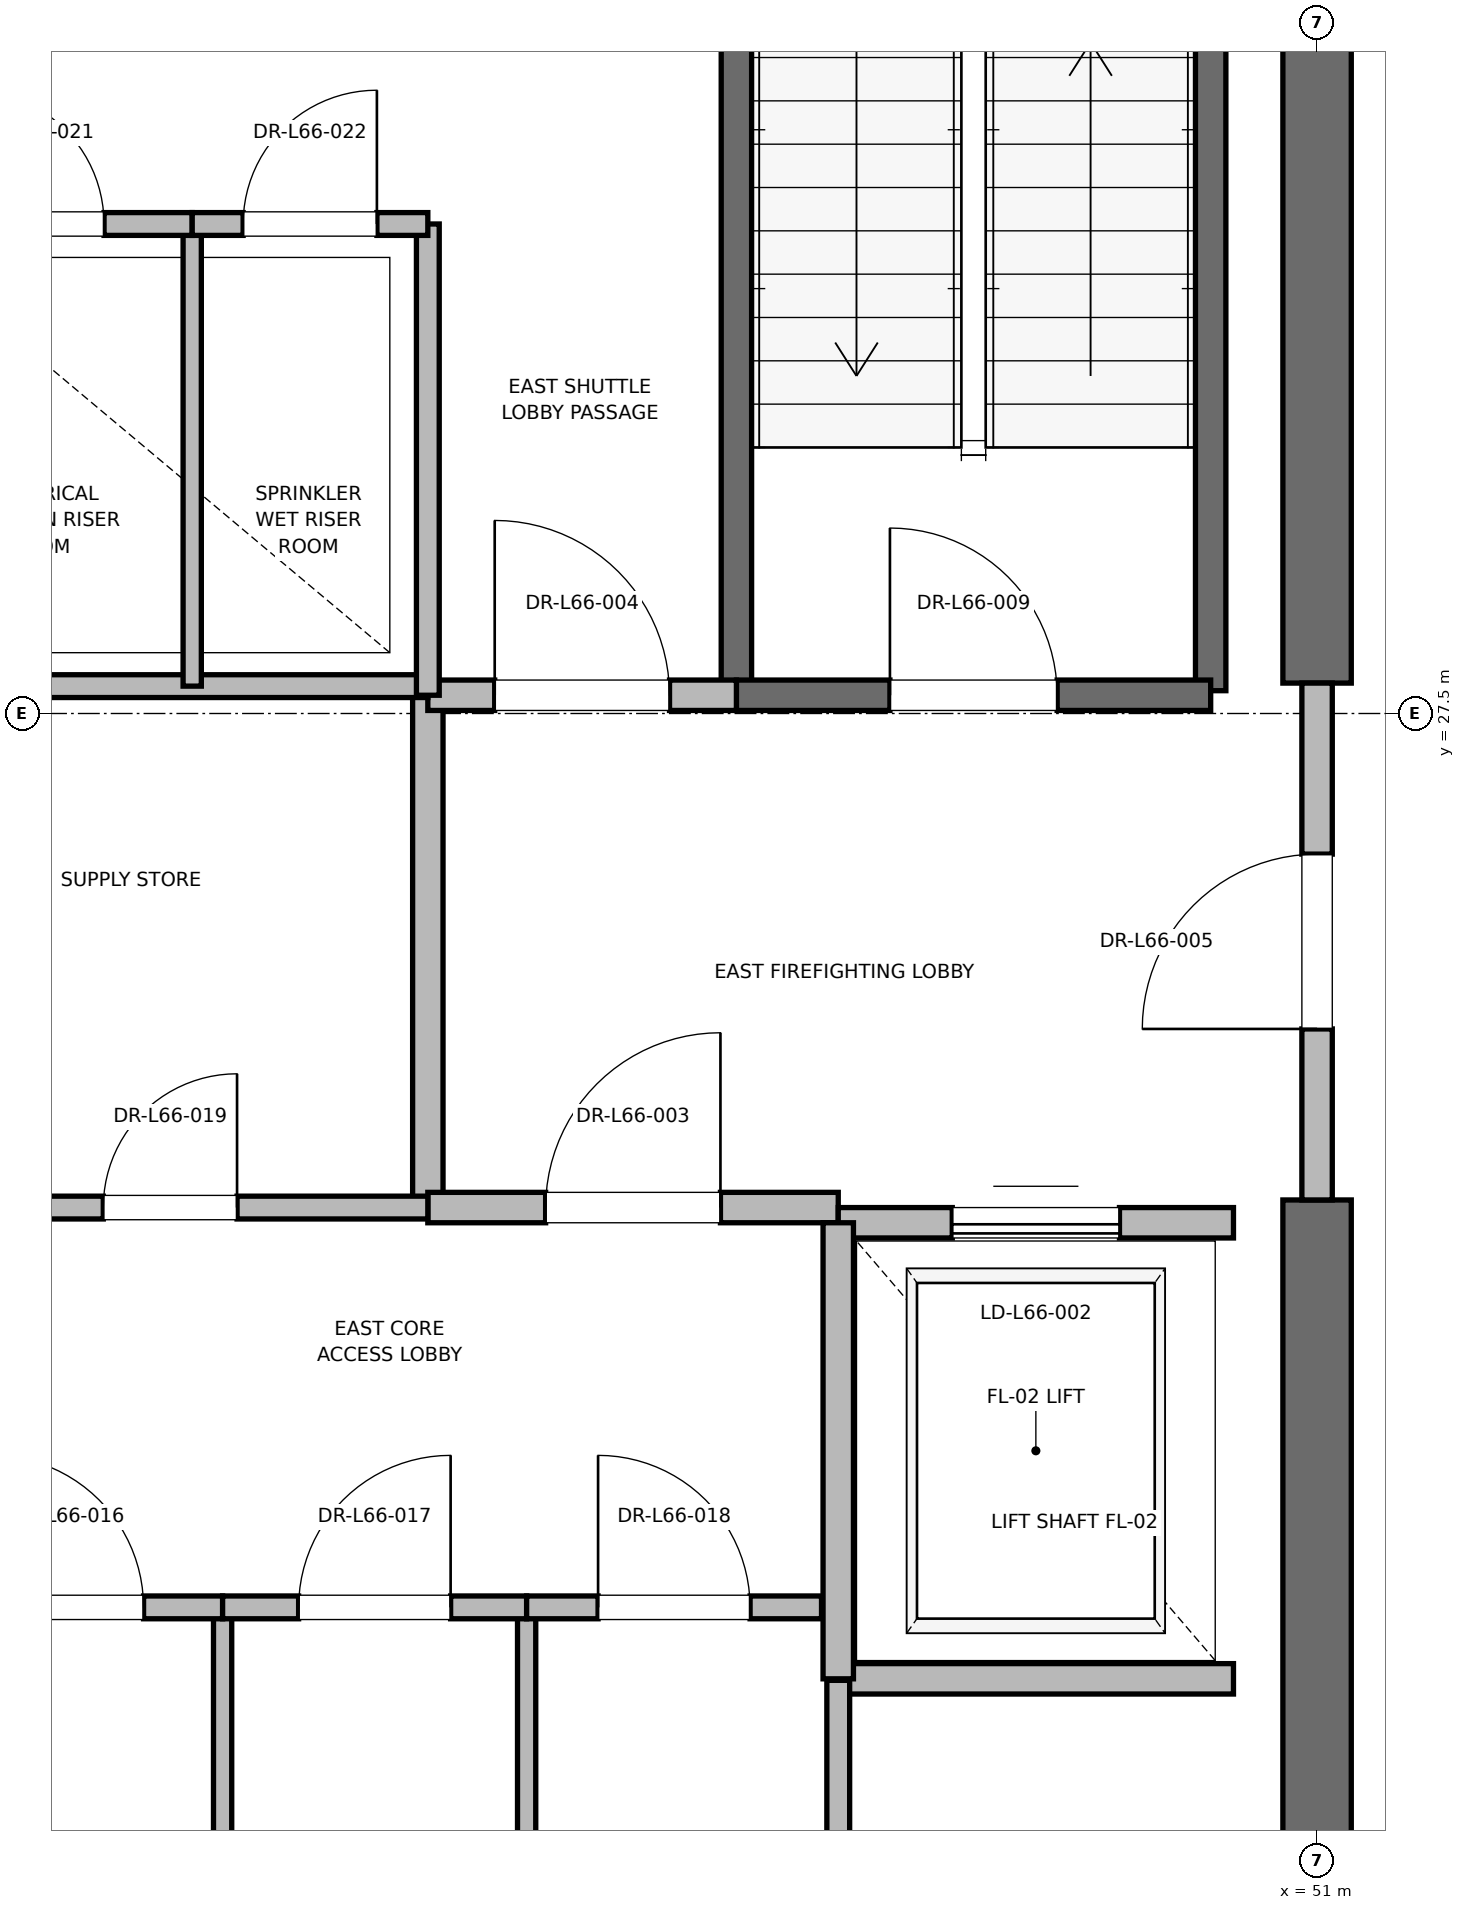
"""IFC4 building model, lengths in metres.
Left out: names, types, materials, properties, quantities, classifications, styles, units other than length and angle.
Written with IfcOpenShell. Run it as: python <this file> out.ifc"""

import sys

from ifc_helpers import new_model, si_unit, direction, frame, frame_2d, origin, place, context, subcontext, project, spatial, rectangle, extrude, element, fill, save


model = new_model("IFC4")
c1 = context("Model", 3, precision=1e-05, world=origin(), true_north=direction((0.0, 1.0)))
c2 = subcontext(c1, "Body", "Model", "MODEL_VIEW")
j1 = project(units=[si_unit("LENGTHUNIT", "METRE"), si_unit("PLANEANGLEUNIT", "RADIAN")], contexts=[c1])
p1 = place(None, origin())
s1 = spatial("IfcSite", under=j1, at=p1, CompositionType="ELEMENT")
p2 = place(p1, origin())
s2 = spatial("IfcBuilding", under=s1, at=p2, CompositionType="ELEMENT")
p3 = place(p2, frame((0.0, 0.0, 283.2)))
s3 = spatial("IfcBuildingStorey", under=s2, at=p3, CompositionType="ELEMENT", Elevation=283.2)
p4 = place(p3, frame((51.0, 18.5, 0.0), z_axis=(0.0, 0.0, 1.0), x_axis=(0.0, 1.0, 0.0)))
e1 = element("IfcWall", 1, at=p4, inside=s3, PredefinedType="SHEAR", context=c2, shape_type="SweptSolid", body=[
    extrude(rectangle(XDim=5.8, YDim=0.45, at=frame_2d((2.9, 0.0))), origin(), (0.0, 0.0, 1.0), 3.785),
])
p5 = place(p3, frame((51.0, 27.7, 0.0), z_axis=(0.0, 0.0, 1.0), x_axis=(0.0, 1.0, 0.0)))
e2 = element("IfcWall", 2, at=p5, inside=s3, PredefinedType="SHEAR", context=c2, shape_type="SweptSolid", body=[
    extrude(rectangle(XDim=8.8, YDim=0.45, at=frame_2d((4.4, 0.0))), origin(), (0.0, 0.0, 1.0), 3.785),
])
p6 = place(p3, frame((50.3, 27.65, 0.0), z_axis=(0.0, 0.0, 1.0), x_axis=(0.0, 1.0, 0.0)))
e3 = element("IfcWall", 3, at=p6, inside=s3, PredefinedType="SOLIDWALL", context=c2, shape_type="SweptSolid", body=[
    extrude(rectangle(XDim=8.15, YDim=0.2, at=frame_2d((4.075, 0.0))), origin(), (0.0, 0.0, 1.0), 3.785),
])
p7 = place(p3, frame((47.18, 27.62, 0.0), z_axis=(0.0, 0.0, 1.0), x_axis=(0.0, 1.0, 0.0)))
e4 = element("IfcWall", 4, at=p7, inside=s3, PredefinedType="SOLIDWALL", context=c2, shape_type="SweptSolid", body=[
    extrude(rectangle(XDim=8.18, YDim=0.2, at=frame_2d((4.09, 0.0))), origin(), (0.0, 0.0, 1.0), 3.785),
])
p8 = place(p3, frame((47.18, 27.62, 0.0), z_axis=(0.0, 0.0, 1.0), x_axis=(1.0, 0.0, 0.0)))
e5 = element("IfcWall", 5, at=p8, inside=s3, PredefinedType="SOLIDWALL", context=c2, shape_type="SweptSolid", body=[
    extrude(rectangle(XDim=3.12, YDim=0.2, at=frame_2d((1.56, 0.0))), origin(), (0.0, 0.0, 1.0), 3.785),
])
p9 = place(p8, frame((1.01, 0.0, 0.0)))
e6 = element("IfcOpeningElement", 6, at=p9, cuts=e5, PredefinedType="OPENING", context=c2, shape_type="SweptSolid", body=[
    extrude(rectangle(XDim=1.1, YDim=2.15, at=frame_2d((0.55, 1.075))), frame((0.0, 0.1, 0.0), z_axis=(0.0, -1.0, 0.0), x_axis=(1.0, 0.0, 0.0)), (0.0, 0.0, 1.0), 0.2),
])
p10 = place(p3, frame((45.15, 24.25, 0.0), z_axis=(0.0, 0.0, 1.0), x_axis=(0.0, 1.0, 0.0)))
e7 = element("IfcWall", 7, at=p10, inside=s3, PredefinedType="PARTITIONING", context=c2, shape_type="SweptSolid", body=[
    extrude(rectangle(XDim=3.37, YDim=0.2, at=frame_2d((1.685, 0.0))), origin(), (0.0, 0.0, 1.0), 3.785),
])
p11 = place(p3, frame((45.15, 24.25, 0.0), z_axis=(0.0, 0.0, 1.0), x_axis=(1.0, 0.0, 0.0)))
e8 = element("IfcWall", 8, at=p11, inside=s3, PredefinedType="PARTITIONING", context=c2, shape_type="SweptSolid", body=[
    extrude(rectangle(XDim=2.7, YDim=0.2, at=frame_2d((1.35, 0.0))), origin(), (0.0, 0.0, 1.0), 3.785),
])
p12 = place(p11, frame((0.775, 0.0, 0.0)))
e9 = element("IfcOpeningElement", 9, at=p12, cuts=e8, PredefinedType="OPENING", context=c2, shape_type="SweptSolid", body=[
    extrude(rectangle(XDim=1.15, YDim=2.2, at=frame_2d((0.575, 1.1))), frame((0.0, 0.1, 0.0), z_axis=(0.0, -1.0, 0.0), x_axis=(1.0, 0.0, 0.0)), (0.0, 0.0, 1.0), 0.2),
])
p13 = place(p3, frame((45.15, 27.62, 0.0), z_axis=(0.0, 0.0, 1.0), x_axis=(1.0, 0.0, 0.0)))
e10 = element("IfcWall", 10, at=p13, inside=s3, PredefinedType="PARTITIONING", context=c2, shape_type="SweptSolid", body=[
    extrude(rectangle(XDim=2.03, YDim=0.2, at=frame_2d((1.015, 0.0))), origin(), (0.0, 0.0, 1.0), 3.785),
])
p14 = place(p13, frame((0.44, 0.0, 0.0)))
e11 = element("IfcOpeningElement", 11, at=p14, cuts=e10, PredefinedType="OPENING", context=c2, shape_type="SweptSolid", body=[
    extrude(rectangle(XDim=1.15, YDim=2.2, at=frame_2d((0.575, 1.1))), frame((0.0, 0.1, 0.0), z_axis=(0.0, -1.0, 0.0), x_axis=(1.0, 0.0, 0.0)), (0.0, 0.0, 1.0), 0.2),
])
p15 = place(p3, frame((51.0, 24.3, 0.0), z_axis=(0.0, 0.0, 1.0), x_axis=(0.0, 1.0, 0.0)))
e12 = element("IfcWall", 12, at=p15, inside=s3, PredefinedType="PARTITIONING", context=c2, shape_type="SweptSolid", body=[
    extrude(rectangle(XDim=3.4, YDim=0.2, at=frame_2d((1.7, 0.0))), origin(), (0.0, 0.0, 1.0), 2.865),
])
p16 = place(p15, frame((1.125, 0.0, 0.0)))
e13 = element("IfcOpeningElement", 13, at=p16, cuts=e12, PredefinedType="OPENING", context=c2, shape_type="SweptSolid", body=[
    extrude(rectangle(XDim=1.15, YDim=2.2, at=frame_2d((0.575, 1.1))), frame((0.0, 0.1, 0.0), z_axis=(0.0, -1.0, 0.0), x_axis=(1.0, 0.0, 0.0)), (0.0, 0.0, 1.0), 0.2),
])
p17 = place(p3, frame((47.85, 21.15, 0.0), z_axis=(0.0, 0.0, 1.0), x_axis=(1.0, 0.0, 0.0)))
e14 = element("IfcWall", 14, at=p17, inside=s3, PredefinedType="SOLIDWALL", context=c2, shape_type="SweptSolid", body=[
    extrude(rectangle(XDim=2.6, YDim=0.2, at=frame_2d((1.3, 0.0))), origin(), (0.0, 0.0, 1.0), 3.785),
])
p18 = place(p3, frame((50.45, 24.15, 0.0), z_axis=(0.0, 0.0, 1.0), x_axis=(-1.0, 0.0, 0.0)))
e15 = element("IfcWall", 15, at=p18, inside=s3, PredefinedType="SOLIDWALL", context=c2, shape_type="SweptSolid", body=[
    extrude(rectangle(XDim=2.6, YDim=0.2, at=frame_2d((1.3, 0.0))), origin(), (0.0, 0.0, 1.0), 2.865),
])
p19 = place(p18, frame((0.75, 0.0, 0.0)))
e16 = element("IfcOpeningElement", 16, at=p19, cuts=e15, PredefinedType="OPENING", context=c2, shape_type="SweptSolid", body=[
    extrude(rectangle(XDim=1.1, YDim=2.2, at=frame_2d((0.55, 1.1))), frame((0.0, 0.1, 0.0), z_axis=(0.0, -1.0, 0.0), x_axis=(1.0, 0.0, 0.0)), (0.0, 0.0, 1.0), 0.2),
])
p20 = place(p3, frame((47.85, 24.15, 0.0), z_axis=(0.0, 0.0, 1.0), x_axis=(0.0, -1.0, 0.0)))
e17 = element("IfcWall", 17, at=p20, inside=s3, PredefinedType="SOLIDWALL", context=c2, shape_type="SweptSolid", body=[
    extrude(rectangle(XDim=3.0, YDim=0.2, at=frame_2d((1.5, 0.0))), origin(), (0.0, 0.0, 1.0), 3.785),
])
p21 = place(p3, frame((41.56, 27.68, 0.0), z_axis=(0.0, 0.0, 1.0), x_axis=(1.0, 0.0, 0.0)))
e18 = element("IfcWall", 18, at=p21, inside=s3, PredefinedType="PARTITIONING", context=c2, shape_type="SweptSolid", body=[
    extrude(rectangle(XDim=3.59, YDim=0.15, at=frame_2d((1.795, 0.0))), origin(), (0.0, 0.0, 1.0), 2.85),
])
p22 = place(p3, frame((47.85, 18.6, 0.0), z_axis=(0.0, 0.0, 1.0), x_axis=(0.0, 1.0, 0.0)))
e19 = element("IfcWall", 19, at=p22, inside=s3, PredefinedType="PARTITIONING", context=c2, shape_type="SweptSolid", body=[
    extrude(rectangle(XDim=2.54, YDim=0.15, at=frame_2d((1.27, 0.0))), origin(), (0.0, 0.0, 1.0), 2.85),
])
for number, where, z_axis, x_axis in (
    (20, (43.8, 18.6, 0.0), (0.0, 0.0, 1.0), (0.0, 1.0, 0.0)),
    (21, (45.8, 18.6, 0.0), (0.0, 0.0, 1.0), (0.0, 1.0, 0.0)),
):
    element("IfcWall", number, at=place(p3, frame(where, z_axis=z_axis, x_axis=x_axis)), inside=s3, PredefinedType="PARTITIONING", context=c2, shape_type="SweptSolid", body=[
        extrude(rectangle(XDim=3.02, YDim=0.12, at=frame_2d((1.51, 0.0))), origin(), (0.0, 0.0, 1.0), 2.85),
    ])
p23 = place(p3, frame((41.76, 21.62, 0.0), z_axis=(0.0, 0.0, 1.0), x_axis=(1.0, 0.0, 0.0)))
e22 = element("IfcWall", 22, at=p23, inside=s3, PredefinedType="PARTITIONING", context=c2, shape_type="SweptSolid", body=[
    extrude(rectangle(XDim=2.04, YDim=0.15, at=frame_2d((1.02, 0.0))), origin(), (0.0, 0.0, 1.0), 2.85),
])
p24 = place(p23, frame((0.52, 0.0, 0.0)))
e23 = element("IfcOpeningElement", 23, at=p24, cuts=e22, PredefinedType="OPENING", context=c2, shape_type="SweptSolid", body=[
    extrude(rectangle(XDim=1.0, YDim=2.15, at=frame_2d((0.5, 1.075))), frame((0.0, 0.075, 0.0), z_axis=(0.0, -1.0, 0.0), x_axis=(1.0, 0.0, 0.0)), (0.0, 0.0, 1.0), 0.15),
])
p25 = place(p3, frame((43.8, 21.62, 0.0), z_axis=(0.0, 0.0, 1.0), x_axis=(1.0, 0.0, 0.0)))
e24 = element("IfcWall", 24, at=p25, inside=s3, PredefinedType="PARTITIONING", context=c2, shape_type="SweptSolid", body=[
    extrude(rectangle(XDim=2.0, YDim=0.15, at=frame_2d((1.0, 0.0))), origin(), (0.0, 0.0, 1.0), 2.85),
])
p26 = place(p25, frame((0.5, 0.0, 0.0)))
e25 = element("IfcOpeningElement", 25, at=p26, cuts=e24, PredefinedType="OPENING", context=c2, shape_type="SweptSolid", body=[
    extrude(rectangle(XDim=1.0, YDim=2.15, at=frame_2d((0.5, 1.075))), frame((0.0, 0.075, 0.0), z_axis=(0.0, -1.0, 0.0), x_axis=(1.0, 0.0, 0.0)), (0.0, 0.0, 1.0), 0.15),
])
p27 = place(p3, frame((45.8, 21.62, 0.0), z_axis=(0.0, 0.0, 1.0), x_axis=(1.0, 0.0, 0.0)))
e26 = element("IfcWall", 26, at=p27, inside=s3, PredefinedType="PARTITIONING", context=c2, shape_type="SweptSolid", body=[
    extrude(rectangle(XDim=1.94, YDim=0.15, at=frame_2d((0.97, 0.0))), origin(), (0.0, 0.0, 1.0), 2.85),
])
p28 = place(p27, frame((0.47, 0.0, 0.0)))
e27 = element("IfcOpeningElement", 27, at=p28, cuts=e26, PredefinedType="OPENING", context=c2, shape_type="SweptSolid", body=[
    extrude(rectangle(XDim=1.0, YDim=2.15, at=frame_2d((0.5, 1.075))), frame((0.0, 0.075, 0.0), z_axis=(0.0, -1.0, 0.0), x_axis=(1.0, 0.0, 0.0)), (0.0, 0.0, 1.0), 0.15),
])
p29 = place(p3, frame((41.76, 24.25, 0.0), z_axis=(0.0, 0.0, 1.0), x_axis=(1.0, 0.0, 0.0)))
e28 = element("IfcWall", 28, at=p29, inside=s3, PredefinedType="PARTITIONING", context=c2, shape_type="SweptSolid", body=[
    extrude(rectangle(XDim=3.39, YDim=0.15, at=frame_2d((1.695, 0.0))), origin(), (0.0, 0.0, 1.0), 2.85),
])
p30 = place(p29, frame((1.255, 0.0, 0.0)))
e29 = element("IfcOpeningElement", 29, at=p30, cuts=e28, PredefinedType="OPENING", context=c2, shape_type="SweptSolid", body=[
    extrude(rectangle(XDim=0.88, YDim=2.1, at=frame_2d((0.44, 1.05))), frame((0.0, 0.075, 0.0), z_axis=(0.0, -1.0, 0.0), x_axis=(1.0, 0.0, 0.0)), (0.0, 0.0, 1.0), 0.15),
])
p31 = place(p3, frame((45.15, 27.62, 0.0), z_axis=(0.0, 0.0, 1.0), x_axis=(0.0, 1.0, 0.0)))
e30 = element("IfcWall", 30, at=p31, inside=s3, PredefinedType="PARTITIONING", context=c2, shape_type="SweptSolid", body=[
    extrude(rectangle(XDim=3.1, YDim=0.15, at=frame_2d((1.55, 0.0))), origin(), (0.0, 0.0, 1.0), 2.85),
])
p32 = place(p3, frame((43.6, 27.68, 0.0), z_axis=(0.0, 0.0, 1.0), x_axis=(0.0, 1.0, 0.0)))
e31 = element("IfcWall", 31, at=p32, inside=s3, PredefinedType="PARTITIONING", context=c2, shape_type="SweptSolid", body=[
    extrude(rectangle(XDim=3.04, YDim=0.12, at=frame_2d((1.52, 0.0))), origin(), (0.0, 0.0, 1.0), 2.85),
])
p33 = place(p3, frame((41.56, 30.72, 0.0), z_axis=(0.0, 0.0, 1.0), x_axis=(1.0, 0.0, 0.0)))
e32 = element("IfcWall", 32, at=p33, inside=s3, PredefinedType="PARTITIONING", context=c2, shape_type="SweptSolid", body=[
    extrude(rectangle(XDim=2.04, YDim=0.15, at=frame_2d((1.02, 0.0))), origin(), (0.0, 0.0, 1.0), 2.85),
])
p34 = place(p33, frame((0.58, 0.0, 0.0)))
e33 = element("IfcOpeningElement", 33, at=p34, cuts=e32, PredefinedType="OPENING", context=c2, shape_type="SweptSolid", body=[
    extrude(rectangle(XDim=0.88, YDim=2.1, at=frame_2d((0.44, 1.05))), frame((0.0, 0.075, 0.0), z_axis=(0.0, -1.0, 0.0), x_axis=(1.0, 0.0, 0.0)), (0.0, 0.0, 1.0), 0.15),
])
p35 = place(p3, frame((43.6, 30.72, 0.0), z_axis=(0.0, 0.0, 1.0), x_axis=(1.0, 0.0, 0.0)))
e34 = element("IfcWall", 34, at=p35, inside=s3, PredefinedType="PARTITIONING", context=c2, shape_type="SweptSolid", body=[
    extrude(rectangle(XDim=1.55, YDim=0.15, at=frame_2d((0.775, 0.0))), origin(), (0.0, 0.0, 1.0), 2.85),
])
p36 = place(p35, frame((0.335, 0.0, 0.0)))
e35 = element("IfcOpeningElement", 35, at=p36, cuts=e34, PredefinedType="OPENING", context=c2, shape_type="SweptSolid", body=[
    extrude(rectangle(XDim=0.88, YDim=2.1, at=frame_2d((0.44, 1.05))), frame((0.0, 0.075, 0.0), z_axis=(0.0, -1.0, 0.0), x_axis=(1.0, 0.0, 0.0)), (0.0, 0.0, 1.0), 0.15),
])
p37 = place(p9, origin())
e36 = element("IfcDoor", 36, at=p37, inside=s3, OperationType="SINGLE_SWING_LEFT", PredefinedType="DOOR", context=c2, shape_type="SweptSolid", body=[
    extrude(rectangle(XDim=1.1, YDim=2.15, at=frame_2d((0.55, 1.075))), frame((0.0, 0.025, 0.0), z_axis=(0.0, -1.0, 0.0), x_axis=(1.0, 0.0, 0.0)), (0.0, 0.0, 1.0), 0.05),
])
fill(e6, e36)
p38 = place(p12, origin())
e37 = element("IfcDoor", 37, at=p38, inside=s3, OperationType="SINGLE_SWING_RIGHT", PredefinedType="DOOR", context=c2, shape_type="SweptSolid", body=[
    extrude(rectangle(XDim=1.15, YDim=2.2, at=frame_2d((0.575, 1.1))), frame((0.0, 0.025, 0.0), z_axis=(0.0, -1.0, 0.0), x_axis=(1.0, 0.0, 0.0)), (0.0, 0.0, 1.0), 0.05),
])
fill(e9, e37)
p39 = place(p14, origin())
e38 = element("IfcDoor", 38, at=p39, inside=s3, OperationType="SINGLE_SWING_LEFT", PredefinedType="DOOR", context=c2, shape_type="SweptSolid", body=[
    extrude(rectangle(XDim=1.15, YDim=2.2, at=frame_2d((0.575, 1.1))), frame((0.0, 0.025, 0.0), z_axis=(0.0, -1.0, 0.0), x_axis=(1.0, 0.0, 0.0)), (0.0, 0.0, 1.0), 0.05),
])
fill(e11, e38)
p40 = place(p16, origin())
e39 = element("IfcDoor", 39, at=p40, inside=s3, OperationType="SINGLE_SWING_LEFT", PredefinedType="DOOR", context=c2, shape_type="SweptSolid", body=[
    extrude(rectangle(XDim=1.15, YDim=2.2, at=frame_2d((0.575, 1.1))), frame((0.0, 0.025, 0.0), z_axis=(0.0, -1.0, 0.0), x_axis=(1.0, 0.0, 0.0)), (0.0, 0.0, 1.0), 0.05),
])
fill(e13, e39)
p41 = place(p19, origin())
e40 = element("IfcDoor", 40, at=p41, inside=s3, OperationType="SLIDING_TO_RIGHT", PredefinedType="DOOR", context=c2, shape_type="SweptSolid", body=[
    extrude(rectangle(XDim=1.1, YDim=2.2, at=frame_2d((0.55, 1.1))), frame((0.0, 0.025, 0.0), z_axis=(0.0, -1.0, 0.0), x_axis=(1.0, 0.0, 0.0)), (0.0, 0.0, 1.0), 0.05),
])
fill(e16, e40)
p42 = place(p24, origin())
e41 = element("IfcDoor", 41, at=p42, inside=s3, OperationType="SINGLE_SWING_LEFT", PredefinedType="DOOR", context=c2, shape_type="SweptSolid", body=[
    extrude(rectangle(XDim=1.0, YDim=2.15, at=frame_2d((0.5, 1.075))), frame((0.0, 0.025, 0.0), z_axis=(0.0, -1.0, 0.0), x_axis=(1.0, 0.0, 0.0)), (0.0, 0.0, 1.0), 0.05),
])
fill(e23, e41)
p43 = place(p26, origin())
e42 = element("IfcDoor", 42, at=p43, inside=s3, OperationType="SINGLE_SWING_RIGHT", PredefinedType="DOOR", context=c2, shape_type="SweptSolid", body=[
    extrude(rectangle(XDim=1.0, YDim=2.15, at=frame_2d((0.5, 1.075))), frame((0.0, 0.025, 0.0), z_axis=(0.0, -1.0, 0.0), x_axis=(1.0, 0.0, 0.0)), (0.0, 0.0, 1.0), 0.05),
])
fill(e25, e42)
p44 = place(p28, origin())
e43 = element("IfcDoor", 43, at=p44, inside=s3, OperationType="SINGLE_SWING_LEFT", PredefinedType="DOOR", context=c2, shape_type="SweptSolid", body=[
    extrude(rectangle(XDim=1.0, YDim=2.15, at=frame_2d((0.5, 1.075))), frame((0.0, 0.025, 0.0), z_axis=(0.0, -1.0, 0.0), x_axis=(1.0, 0.0, 0.0)), (0.0, 0.0, 1.0), 0.05),
])
fill(e27, e43)
p45 = place(p30, origin())
e44 = element("IfcDoor", 44, at=p45, inside=s3, OperationType="SINGLE_SWING_RIGHT", PredefinedType="DOOR", context=c2, shape_type="SweptSolid", body=[
    extrude(rectangle(XDim=0.88, YDim=2.1, at=frame_2d((0.44, 1.05))), frame((0.0, 0.025, 0.0), z_axis=(0.0, -1.0, 0.0), x_axis=(1.0, 0.0, 0.0)), (0.0, 0.0, 1.0), 0.05),
])
fill(e29, e44)
p46 = place(p34, origin())
e45 = element("IfcDoor", 45, at=p46, inside=s3, OperationType="SINGLE_SWING_LEFT", PredefinedType="DOOR", context=c2, shape_type="SweptSolid", body=[
    extrude(rectangle(XDim=0.88, YDim=2.1, at=frame_2d((0.44, 1.05))), frame((0.0, 0.025, 0.0), z_axis=(0.0, -1.0, 0.0), x_axis=(1.0, 0.0, 0.0)), (0.0, 0.0, 1.0), 0.05),
])
fill(e33, e45)
p47 = place(p36, origin())
e46 = element("IfcDoor", 46, at=p47, inside=s3, OperationType="SINGLE_SWING_RIGHT", PredefinedType="DOOR", context=c2, shape_type="SweptSolid", body=[
    extrude(rectangle(XDim=0.88, YDim=2.1, at=frame_2d((0.44, 1.05))), frame((0.0, 0.025, 0.0), z_axis=(0.0, -1.0, 0.0), x_axis=(1.0, 0.0, 0.0)), (0.0, 0.0, 1.0), 0.05),
])
fill(e35, e46)
save(model, sys.argv[1])
